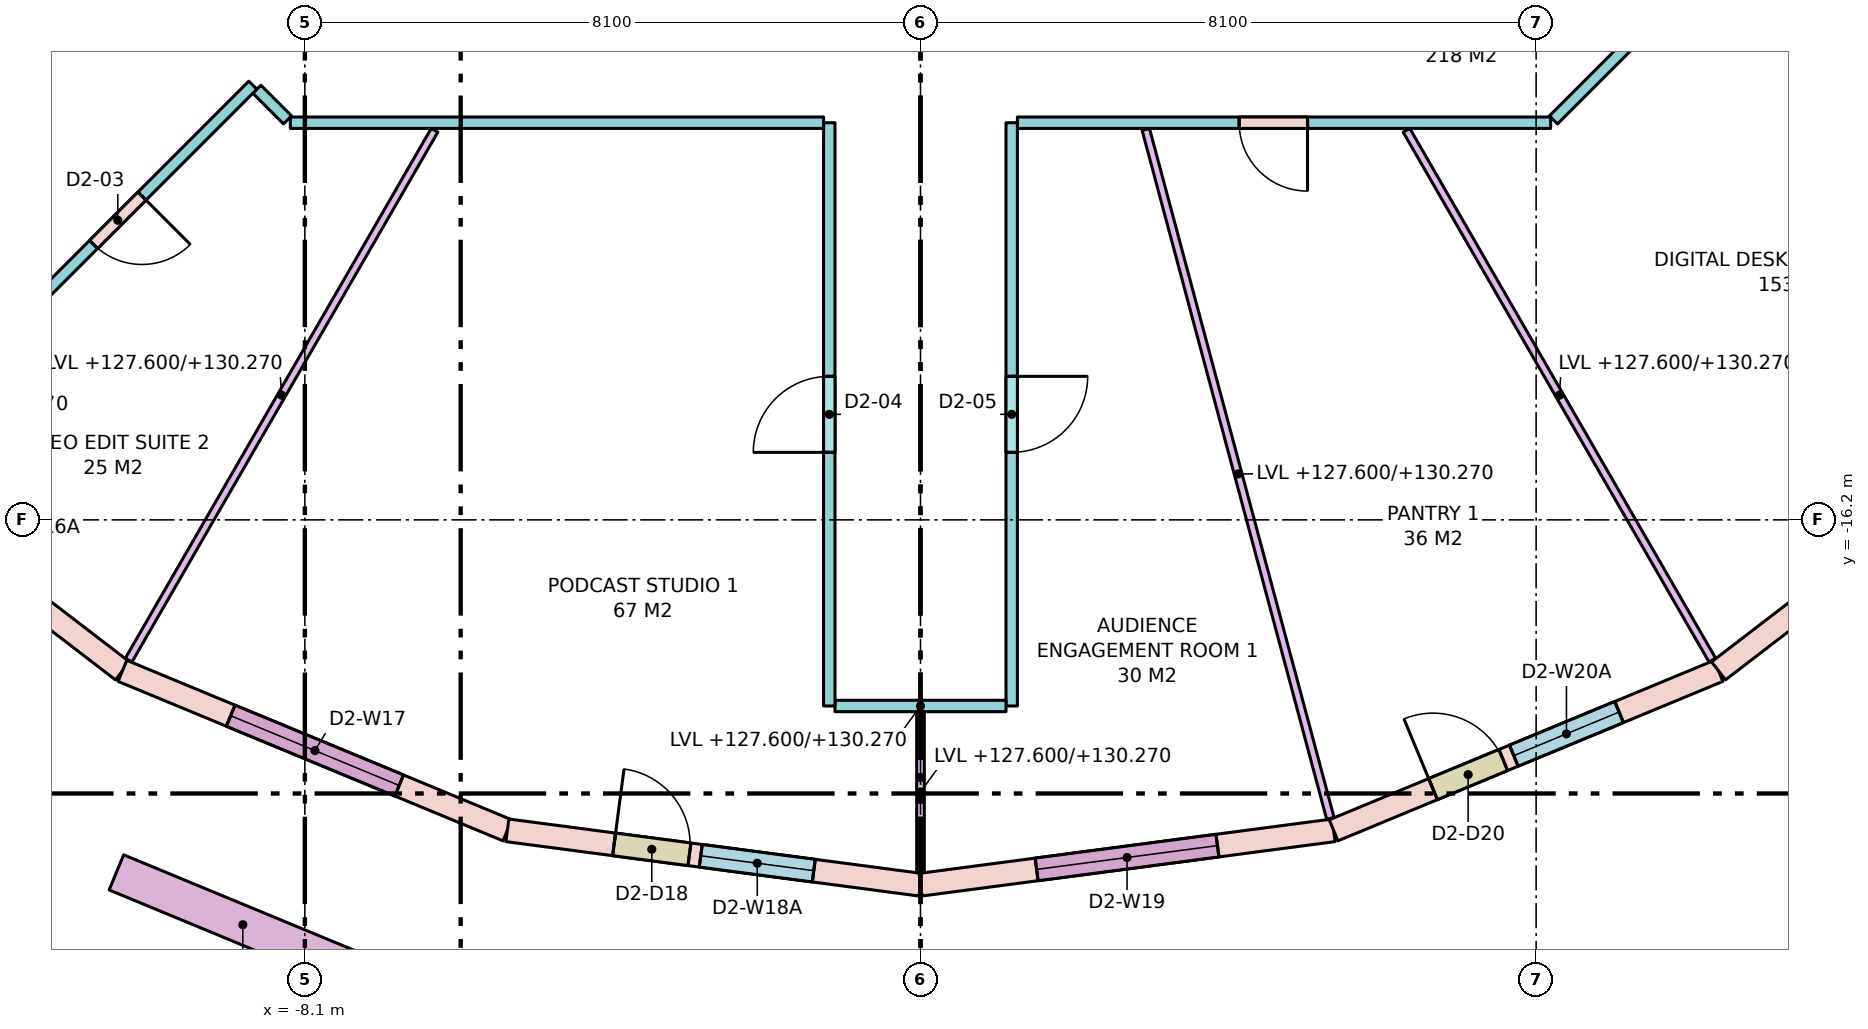
"""IFC4 building model, lengths in metres.
Left out: names, types, materials, properties, quantities, classifications, styles, units other than length and angle.
Written with IfcOpenShell. Run it as: python <this file> out.ifc"""

import sys

from ifc_helpers import new_model, si_unit, direction, frame, frame_2d, origin, place, context, subcontext, project, spatial, rectangle, extrude, element, fill, save


model = new_model("IFC4")
c1 = context("Model", 3, precision=1e-05, world=origin(), true_north=direction((0.0, 1.0)))
c2 = subcontext(c1, "Body", "Model", "MODEL_VIEW")
j1 = project(units=[si_unit("LENGTHUNIT", "METRE"), si_unit("PLANEANGLEUNIT", "RADIAN")], contexts=[c1])
p1 = place(None, origin())
s1 = spatial("IfcSite", under=j1, at=p1, CompositionType="ELEMENT")
p2 = place(p1, origin())
s2 = spatial("IfcBuilding", under=s1, at=p2, CompositionType="ELEMENT")
p3 = place(p2, frame((0.0, 0.0, 127.6)))
s3 = spatial("IfcBuildingStorey", under=s2, at=p3, CompositionType="ELEMENT", Elevation=127.6)
p4 = place(p3, frame((-14.849, -14.849, 0.0), z_axis=(0.0, 0.0, 1.0), x_axis=(0.793335336593, -0.608784891166, 0.0)))
e1 = element("IfcWall", 1, at=p4, inside=s3, PredefinedType="STANDARD", context=c2, shape_type="SweptSolid", body=[
    extrude(rectangle(XDim=5.482, YDim=0.3, at=frame_2d((2.741, 0.0))), origin(), (0.0, 0.0, 1.0), 3.52),
])
p5 = place(p4, frame((1.416, 0.0, 0.0)))
e2 = element("IfcOpeningElement", 2, at=p5, cuts=e1, PredefinedType="OPENING", context=c2, shape_type="SweptSolid", body=[
    extrude(rectangle(XDim=1.0, YDim=2.4, at=frame_2d((0.5, 1.2))), frame((0.0, 0.16, 0.0), z_axis=(0.0, -1.0, 0.0), x_axis=(1.0, 0.0, 0.0)), (0.0, 0.0, 1.0), 0.32),
])
p6 = place(p4, frame((2.566, 0.0, 0.8)))
e3 = element("IfcOpeningElement", 3, at=p6, cuts=e1, PredefinedType="OPENING", context=c2, shape_type="SweptSolid", body=[
    extrude(rectangle(XDim=1.5, YDim=2.5, at=frame_2d((0.75, 1.25))), frame((0.0, 0.16, 0.0), z_axis=(0.0, -1.0, 0.0), x_axis=(1.0, 0.0, 0.0)), (0.0, 0.0, 1.0), 0.32),
])
p7 = place(p3, frame((-10.5, -18.187, 0.0), z_axis=(0.0, 0.0, 1.0), x_axis=(0.923877333662, -0.382688740813, 0.0)))
e4 = element("IfcWall", 4, at=p7, inside=s3, PredefinedType="STANDARD", context=c2, shape_type="SweptSolid", body=[
    extrude(rectangle(XDim=5.482, YDim=0.3, at=frame_2d((2.741, 0.0))), origin(), (0.0, 0.0, 1.0), 3.52),
])
p8 = place(p7, frame((1.541, 0.0, 0.8)))
e5 = element("IfcOpeningElement", 5, at=p8, cuts=e4, PredefinedType="OPENING", context=c2, shape_type="SweptSolid", body=[
    extrude(rectangle(XDim=2.4, YDim=2.5, at=frame_2d((1.2, 1.25))), frame((0.0, 0.16, 0.0), z_axis=(0.0, -1.0, 0.0), x_axis=(1.0, 0.0, 0.0)), (0.0, 0.0, 1.0), 0.32),
])
p9 = place(p3, frame((-5.435, -20.284, 0.0), z_axis=(0.0, 0.0, 1.0), x_axis=(0.991444743541, -0.130527087244, 0.0)))
e6 = element("IfcWall", 6, at=p9, inside=s3, PredefinedType="STANDARD", context=c2, shape_type="SweptSolid", body=[
    extrude(rectangle(XDim=5.482, YDim=0.3, at=frame_2d((2.741, 0.0))), origin(), (0.0, 0.0, 1.0), 3.52),
])
p10 = place(p9, frame((1.416, 0.0, 0.0)))
e7 = element("IfcOpeningElement", 7, at=p10, cuts=e6, PredefinedType="OPENING", context=c2, shape_type="SweptSolid", body=[
    extrude(rectangle(XDim=1.0, YDim=2.4, at=frame_2d((0.5, 1.2))), frame((0.0, 0.16, 0.0), z_axis=(0.0, -1.0, 0.0), x_axis=(1.0, 0.0, 0.0)), (0.0, 0.0, 1.0), 0.32),
])
p11 = place(p9, frame((2.566, 0.0, 0.8)))
e8 = element("IfcOpeningElement", 8, at=p11, cuts=e6, PredefinedType="OPENING", context=c2, shape_type="SweptSolid", body=[
    extrude(rectangle(XDim=1.5, YDim=2.5, at=frame_2d((0.75, 1.25))), frame((0.0, 0.16, 0.0), z_axis=(0.0, -1.0, 0.0), x_axis=(1.0, 0.0, 0.0)), (0.0, 0.0, 1.0), 0.32),
])
p12 = place(p3, frame((0.0, -21.0, 0.0), z_axis=(0.0, 0.0, 1.0), x_axis=(0.991444743541, 0.130527087244, 0.0)))
e9 = element("IfcWall", 9, at=p12, inside=s3, PredefinedType="STANDARD", context=c2, shape_type="SweptSolid", body=[
    extrude(rectangle(XDim=5.482, YDim=0.3, at=frame_2d((2.741, 0.0))), origin(), (0.0, 0.0, 1.0), 3.52),
])
p13 = place(p12, frame((1.541, 0.0, 0.8)))
e10 = element("IfcOpeningElement", 10, at=p13, cuts=e9, PredefinedType="OPENING", context=c2, shape_type="SweptSolid", body=[
    extrude(rectangle(XDim=2.4, YDim=2.5, at=frame_2d((1.2, 1.25))), frame((0.0, 0.16, 0.0), z_axis=(0.0, -1.0, 0.0), x_axis=(1.0, 0.0, 0.0)), (0.0, 0.0, 1.0), 0.32),
])
p14 = place(p3, frame((5.435, -20.284, 0.0), z_axis=(0.0, 0.0, 1.0), x_axis=(0.923877333662, 0.382688740813, 0.0)))
e11 = element("IfcWall", 11, at=p14, inside=s3, PredefinedType="STANDARD", context=c2, shape_type="SweptSolid", body=[
    extrude(rectangle(XDim=5.482, YDim=0.3, at=frame_2d((2.741, 0.0))), origin(), (0.0, 0.0, 1.0), 3.52),
])
p15 = place(p14, frame((1.416, 0.0, 0.0)))
e12 = element("IfcOpeningElement", 12, at=p15, cuts=e11, PredefinedType="OPENING", context=c2, shape_type="SweptSolid", body=[
    extrude(rectangle(XDim=1.0, YDim=2.4, at=frame_2d((0.5, 1.2))), frame((0.0, 0.16, 0.0), z_axis=(0.0, -1.0, 0.0), x_axis=(1.0, 0.0, 0.0)), (0.0, 0.0, 1.0), 0.32),
])
p16 = place(p14, frame((2.566, 0.0, 0.8)))
e13 = element("IfcOpeningElement", 13, at=p16, cuts=e11, PredefinedType="OPENING", context=c2, shape_type="SweptSolid", body=[
    extrude(rectangle(XDim=1.5, YDim=2.5, at=frame_2d((0.75, 1.25))), frame((0.0, 0.16, 0.0), z_axis=(0.0, -1.0, 0.0), x_axis=(1.0, 0.0, 0.0)), (0.0, 0.0, 1.0), 0.32),
])
p17 = place(p3, frame((10.5, -18.187, 0.0), z_axis=(0.0, 0.0, 1.0), x_axis=(0.793335336593, 0.608784891166, 0.0)))
e14 = element("IfcWall", 14, at=p17, inside=s3, PredefinedType="STANDARD", context=c2, shape_type="SweptSolid", body=[
    extrude(rectangle(XDim=5.482, YDim=0.3, at=frame_2d((2.741, 0.0))), origin(), (0.0, 0.0, 1.0), 3.52),
])
p18 = place(p17, frame((1.541, 0.0, 0.8)))
e15 = element("IfcOpeningElement", 15, at=p18, cuts=e14, PredefinedType="OPENING", context=c2, shape_type="SweptSolid", body=[
    extrude(rectangle(XDim=2.4, YDim=2.5, at=frame_2d((1.2, 1.25))), frame((0.0, 0.16, 0.0), z_axis=(0.0, -1.0, 0.0), x_axis=(1.0, 0.0, 0.0)), (0.0, 0.0, 1.0), 0.32),
])
p19 = place(p3, frame((-10.58, -20.838, 0.0), z_axis=(0.0, 0.0, 1.0), x_axis=(0.923909393783, -0.382611332921, 0.0)))
e16 = element("IfcWall", 16, at=p19, inside=s3, PredefinedType="PARAPET", context=c2, shape_type="SweptSolid", body=[
    extrude(rectangle(XDim=3.6, YDim=0.5, at=frame_2d((1.8, 0.0))), origin(), (0.0, 0.0, 1.0), 0.9),
])
p20 = place(p3, frame((-14.035, -12.338, 0.0), z_axis=(0.0, 0.0, 1.0), x_axis=(0.707106781187, 0.707106781187, 0.0)))
e17 = element("IfcWall", 17, at=p20, inside=s3, PredefinedType="PARTITIONING", context=c2, shape_type="SweptSolid", body=[
    extrude(rectangle(XDim=5.026, YDim=0.15, at=frame_2d((2.513, 0.0))), origin(), (0.0, 0.0, 1.0), 3.52),
])
p21 = place(p20, frame((2.063, 0.0, 0.0)))
e18 = element("IfcOpeningElement", 18, at=p21, cuts=e17, PredefinedType="OPENING", context=c2, shape_type="SweptSolid", body=[
    extrude(rectangle(XDim=0.9, YDim=2.1, at=frame_2d((0.45, 1.05))), frame((0.0, 0.085, 0.0), z_axis=(0.0, -1.0, 0.0), x_axis=(1.0, 0.0, 0.0)), (0.0, 0.0, 1.0), 0.17),
])
p22 = place(p3, frame((12.938, -6.328, 0.0), z_axis=(0.0, 0.0, 1.0), x_axis=(-0.707106781187, -0.707106781187, 0.0)))
e19 = element("IfcWall", 19, at=p22, inside=s3, PredefinedType="PARTITIONING", context=c2, shape_type="SweptSolid", body=[
    extrude(rectangle(XDim=6.52, YDim=0.15, at=frame_2d((3.26, 0.0))), origin(), (0.0, 0.0, 1.0), 2.67),
])
p23 = place(p3, frame((8.291, -10.975, 0.0), z_axis=(0.0, 0.0, 1.0), x_axis=(-1.0, 0.0, 0.0)))
e20 = element("IfcWall", 20, at=p23, inside=s3, PredefinedType="PARTITIONING", context=c2, shape_type="SweptSolid", body=[
    extrude(rectangle(XDim=7.016, YDim=0.15, at=frame_2d((3.508, 0.0))), origin(), (0.0, 0.0, 1.0), 2.67),
])
p24 = place(p23, frame((3.198, 0.0, 0.0)))
e21 = element("IfcOpeningElement", 21, at=p24, cuts=e20, PredefinedType="OPENING", context=c2, shape_type="SweptSolid", body=[
    extrude(rectangle(XDim=0.9, YDim=2.1, at=frame_2d((0.45, 1.05))), frame((0.0, 0.085, 0.0), z_axis=(0.0, -1.0, 0.0), x_axis=(1.0, 0.0, 0.0)), (0.0, 0.0, 1.0), 0.17),
])
p25 = place(p3, frame((1.2, -10.975, 0.0), z_axis=(0.0, 0.0, 1.0), x_axis=(0.0, -1.0, 0.0)))
e22 = element("IfcWall", 22, at=p25, inside=s3, PredefinedType="PARTITIONING", context=c2, shape_type="SweptSolid", body=[
    extrude(rectangle(XDim=7.674, YDim=0.15, at=frame_2d((3.837, 0.0))), origin(), (0.0, 0.0, 1.0), 3.52),
])
p26 = place(p25, frame((3.337, 0.0, 0.0)))
e23 = element("IfcOpeningElement", 23, at=p26, cuts=e22, PredefinedType="OPENING", context=c2, shape_type="SweptSolid", body=[
    extrude(rectangle(XDim=1.0, YDim=2.1, at=frame_2d((0.5, 1.05))), frame((0.0, 0.085, 0.0), z_axis=(0.0, -1.0, 0.0), x_axis=(1.0, 0.0, 0.0)), (0.0, 0.0, 1.0), 0.17),
])
p27 = place(p3, frame((1.125, -18.649, 0.0), z_axis=(0.0, 0.0, 1.0), x_axis=(-1.0, 0.0, 0.0)))
e24 = element("IfcWall", 24, at=p27, inside=s3, PredefinedType="PARTITIONING", context=c2, shape_type="SweptSolid", body=[
    extrude(rectangle(XDim=2.25, YDim=0.15, at=frame_2d((1.125, 0.0))), origin(), (0.0, 0.0, 1.0), 2.67),
])
p28 = place(p3, frame((-1.2, -18.649, 0.0), z_axis=(0.0, 0.0, 1.0), x_axis=(0.0, 1.0, 0.0)))
e25 = element("IfcWall", 25, at=p28, inside=s3, PredefinedType="PARTITIONING", context=c2, shape_type="SweptSolid", body=[
    extrude(rectangle(XDim=7.674, YDim=0.15, at=frame_2d((3.837, 0.0))), origin(), (0.0, 0.0, 1.0), 3.52),
])
p29 = place(p28, frame((3.337, 0.0, 0.0)))
e26 = element("IfcOpeningElement", 26, at=p29, cuts=e25, PredefinedType="OPENING", context=c2, shape_type="SweptSolid", body=[
    extrude(rectangle(XDim=1.0, YDim=2.1, at=frame_2d((0.5, 1.05))), frame((0.0, 0.085, 0.0), z_axis=(0.0, -1.0, 0.0), x_axis=(1.0, 0.0, 0.0)), (0.0, 0.0, 1.0), 0.17),
])
p30 = place(p3, frame((-1.275, -10.975, 0.0), z_axis=(0.0, 0.0, 1.0), x_axis=(-1.0, 0.0, 0.0)))
e27 = element("IfcWall", 27, at=p30, inside=s3, PredefinedType="PARTITIONING", context=c2, shape_type="SweptSolid", body=[
    extrude(rectangle(XDim=7.016, YDim=0.15, at=frame_2d((3.508, 0.0))), origin(), (0.0, 0.0, 1.0), 2.67),
])
p31 = place(p3, frame((-8.328, -10.938, 0.0), z_axis=(0.0, 0.0, 1.0), x_axis=(-0.707106781187, 0.707106781187, 0.0)))
e28 = element("IfcWall", 28, at=p31, inside=s3, PredefinedType="PARTITIONING", context=c2, shape_type="SweptSolid", body=[
    extrude(rectangle(XDim=0.571, YDim=0.15, at=frame_2d((0.285, 0.0))), origin(), (0.0, 0.0, 1.0), 3.52),
])
p32 = place(p3, frame((-8.784, -10.481, 0.0), z_axis=(0.0, 0.0, 1.0), x_axis=(-0.707106781187, -0.707106781187, 0.0)))
e29 = element("IfcWall", 29, at=p32, inside=s3, PredefinedType="PARTITIONING", context=c2, shape_type="SweptSolid", body=[
    extrude(rectangle(XDim=5.026, YDim=0.15, at=frame_2d((2.513, 0.0))), origin(), (0.0, 0.0, 1.0), 3.52),
])
p33 = place(p32, frame((2.063, 0.0, 0.0)))
e30 = element("IfcOpeningElement", 30, at=p33, cuts=e29, PredefinedType="OPENING", context=c2, shape_type="SweptSolid", body=[
    extrude(rectangle(XDim=0.9, YDim=2.1, at=frame_2d((0.45, 1.05))), frame((0.0, 0.085, 0.0), z_axis=(0.0, -1.0, 0.0), x_axis=(1.0, 0.0, 0.0)), (0.0, 0.0, 1.0), 0.17),
])
p34 = place(p3, frame((-6.394, -11.075, 0.0), z_axis=(0.0, 0.0, 1.0), x_axis=(-0.500024397361, -0.866011317503, 0.0)))
e31 = element("IfcWall", 31, at=p34, inside=s3, PredefinedType="PARTITIONING", context=c2, shape_type="SweptSolid", body=[
    extrude(rectangle(XDim=8.049, YDim=0.1, at=frame_2d((4.024, 0.0))), origin(), (0.0, 0.0, 1.0), 2.67),
])
p35 = place(p3, frame((0.0, -18.724, 0.0), z_axis=(0.0, 0.0, 1.0), x_axis=(0.0, -1.0, 0.0)))
e32 = element("IfcWall", 32, at=p35, inside=s3, PredefinedType="PARTITIONING", context=c2, shape_type="SweptSolid", body=[
    extrude(rectangle(XDim=2.113, YDim=0.1, at=frame_2d((1.057, 0.0))), origin(), (0.0, 0.0, 1.0), 2.67),
])
p36 = place(p3, frame((2.965, -11.064, 0.0), z_axis=(0.0, 0.0, 1.0), x_axis=(0.258812392192, -0.965927608906, 0.0)))
e33 = element("IfcWall", 33, at=p36, inside=s3, PredefinedType="PARTITIONING", context=c2, shape_type="SweptSolid", body=[
    extrude(rectangle(XDim=9.382, YDim=0.1, at=frame_2d((4.691, 0.0))), origin(), (0.0, 0.0, 1.0), 2.67),
])
p37 = place(p3, frame((6.394, -11.075, 0.0), z_axis=(0.0, 0.0, 1.0), x_axis=(0.500024397361, -0.866011317503, 0.0)))
e34 = element("IfcWall", 34, at=p37, inside=s3, PredefinedType="PARTITIONING", context=c2, shape_type="SweptSolid", body=[
    extrude(rectangle(XDim=8.049, YDim=0.1, at=frame_2d((4.024, 0.0))), origin(), (0.0, 0.0, 1.0), 2.67),
])
p38 = place(p8, origin())
e35 = element("IfcWindow", 35, at=p38, inside=s3, PartitioningType="SINGLE_PANEL", PredefinedType="WINDOW", context=c2, shape_type="SweptSolid", body=[
    extrude(rectangle(XDim=2.4, YDim=2.5, at=frame_2d((1.2, 1.25))), frame((0.0, 0.03, 0.0), z_axis=(0.0, -1.0, 0.0), x_axis=(1.0, 0.0, 0.0)), (0.0, 0.0, 1.0), 0.06),
])
fill(e5, e35)
p39 = place(p10, origin())
e36 = element("IfcDoor", 36, at=p39, inside=s3, OperationType="SINGLE_SWING_LEFT", PredefinedType="DOOR", context=c2, shape_type="SweptSolid", body=[
    extrude(rectangle(XDim=1.0, YDim=2.4, at=frame_2d((0.5, 1.2))), frame((0.0, 0.025, 0.0), z_axis=(0.0, -1.0, 0.0), x_axis=(1.0, 0.0, 0.0)), (0.0, 0.0, 1.0), 0.05),
])
fill(e7, e36)
p40 = place(p11, origin())
e37 = element("IfcWindow", 37, at=p40, inside=s3, PartitioningType="SINGLE_PANEL", PredefinedType="WINDOW", context=c2, shape_type="SweptSolid", body=[
    extrude(rectangle(XDim=1.5, YDim=2.5, at=frame_2d((0.75, 1.25))), frame((0.0, 0.03, 0.0), z_axis=(0.0, -1.0, 0.0), x_axis=(1.0, 0.0, 0.0)), (0.0, 0.0, 1.0), 0.06),
])
fill(e8, e37)
p41 = place(p13, origin())
e38 = element("IfcWindow", 38, at=p41, inside=s3, PartitioningType="SINGLE_PANEL", PredefinedType="WINDOW", context=c2, shape_type="SweptSolid", body=[
    extrude(rectangle(XDim=2.4, YDim=2.5, at=frame_2d((1.2, 1.25))), frame((0.0, 0.03, 0.0), z_axis=(0.0, -1.0, 0.0), x_axis=(1.0, 0.0, 0.0)), (0.0, 0.0, 1.0), 0.06),
])
fill(e10, e38)
p42 = place(p15, origin())
e39 = element("IfcDoor", 39, at=p42, inside=s3, OperationType="SINGLE_SWING_LEFT", PredefinedType="DOOR", context=c2, shape_type="SweptSolid", body=[
    extrude(rectangle(XDim=1.0, YDim=2.4, at=frame_2d((0.5, 1.2))), frame((0.0, 0.025, 0.0), z_axis=(0.0, -1.0, 0.0), x_axis=(1.0, 0.0, 0.0)), (0.0, 0.0, 1.0), 0.05),
])
fill(e12, e39)
p43 = place(p16, origin())
e40 = element("IfcWindow", 40, at=p43, inside=s3, PartitioningType="SINGLE_PANEL", PredefinedType="WINDOW", context=c2, shape_type="SweptSolid", body=[
    extrude(rectangle(XDim=1.5, YDim=2.5, at=frame_2d((0.75, 1.25))), frame((0.0, 0.03, 0.0), z_axis=(0.0, -1.0, 0.0), x_axis=(1.0, 0.0, 0.0)), (0.0, 0.0, 1.0), 0.06),
])
fill(e13, e40)
p44 = place(p33, origin())
e41 = element("IfcDoor", 41, at=p44, inside=s3, OperationType="SINGLE_SWING_LEFT", PredefinedType="DOOR", context=c2, shape_type="SweptSolid", body=[
    extrude(rectangle(XDim=0.9, YDim=2.1, at=frame_2d((0.45, 1.05))), frame((0.0, 0.025, 0.0), z_axis=(0.0, -1.0, 0.0), x_axis=(1.0, 0.0, 0.0)), (0.0, 0.0, 1.0), 0.05),
])
fill(e30, e41)
p45 = place(p29, origin())
e42 = element("IfcDoor", 42, at=p45, inside=s3, OperationType="SINGLE_SWING_LEFT", PredefinedType="DOOR", context=c2, shape_type="SweptSolid", body=[
    extrude(rectangle(XDim=1.0, YDim=2.1, at=frame_2d((0.5, 1.05))), frame((0.0, 0.025, 0.0), z_axis=(0.0, -1.0, 0.0), x_axis=(1.0, 0.0, 0.0)), (0.0, 0.0, 1.0), 0.05),
])
fill(e26, e42)
p46 = place(p26, origin())
e43 = element("IfcDoor", 43, at=p46, inside=s3, OperationType="SINGLE_SWING_LEFT", PredefinedType="DOOR", context=c2, shape_type="SweptSolid", body=[
    extrude(rectangle(XDim=1.0, YDim=2.1, at=frame_2d((0.5, 1.05))), frame((0.0, 0.025, 0.0), z_axis=(0.0, -1.0, 0.0), x_axis=(1.0, 0.0, 0.0)), (0.0, 0.0, 1.0), 0.05),
])
fill(e23, e43)
p47 = place(p24, origin())
e44 = element("IfcDoor", 44, at=p47, inside=s3, OperationType="SINGLE_SWING_LEFT", PredefinedType="DOOR", context=c2, shape_type="SweptSolid", body=[
    extrude(rectangle(XDim=0.9, YDim=2.1, at=frame_2d((0.45, 1.05))), frame((0.0, 0.025, 0.0), z_axis=(0.0, -1.0, 0.0), x_axis=(1.0, 0.0, 0.0)), (0.0, 0.0, 1.0), 0.05),
])
fill(e21, e44)
save(model, sys.argv[1])
